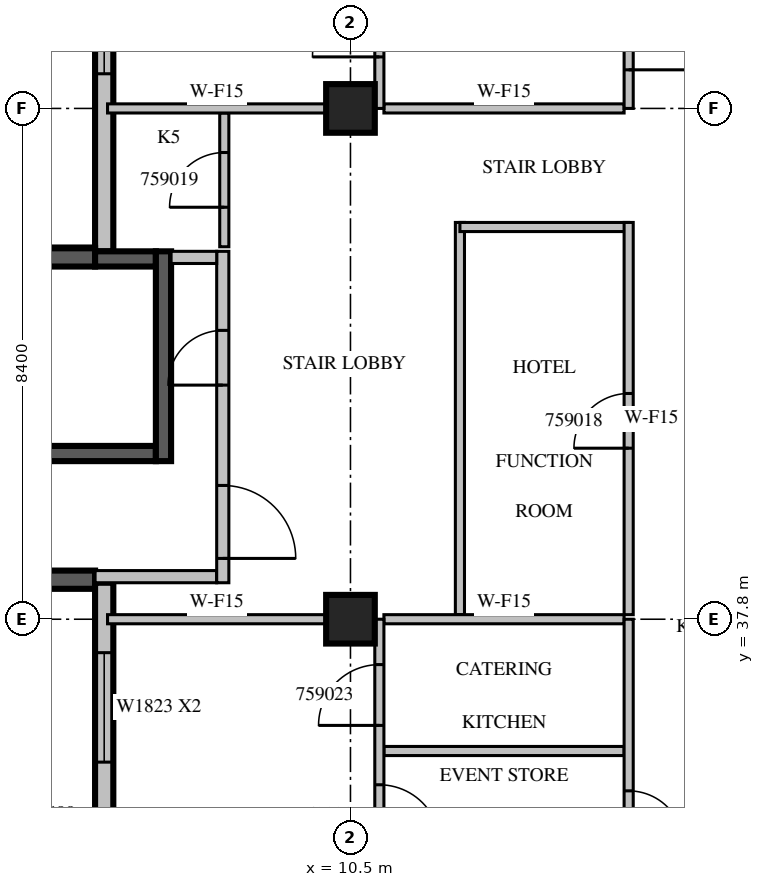
"""IFC4 building model, lengths in metres.
Left out: names, types, materials, properties, quantities, classifications, styles, units other than length and angle.
Written with IfcOpenShell. Run it as: python <this file> out.ifc"""

import sys

from ifc_helpers import new_model, si_unit, direction, frame, frame_2d, origin, origin_2d, place, context, subcontext, project, spatial, rectangle, extrude, source, transform, mapped, element, fill, save


model = new_model("IFC4")
c1 = context("Model", 3, precision=1e-05, world=origin(), true_north=direction((0.0, 1.0)))
c2 = subcontext(c1, "Body", "Model", "MODEL_VIEW")
j1 = project(units=[si_unit("LENGTHUNIT", "METRE"), si_unit("PLANEANGLEUNIT", "RADIAN")], contexts=[c1])
p1 = place(None, origin())
s1 = spatial("IfcSite", under=j1, at=p1, CompositionType="ELEMENT")
p2 = place(p1, origin())
s2 = spatial("IfcBuilding", under=s1, at=p2, CompositionType="ELEMENT")
p3 = place(p2, frame((0.0, 0.0, 257.6)))
s3 = spatial("IfcBuildingStorey", under=s2, at=p3, CompositionType="ELEMENT", Elevation=257.6)
m1 = source(origin(), c2, "Body", "SweptSolid", [
    extrude(rectangle(XDim=0.8, YDim=0.8, at=origin_2d()), origin(), (0.0, 0.0, 1.0), 3.8),
])
for number, where, z_axis, x_axis in (
    (1, (10.5, 37.8, 0.0), (0.0, 0.0, 1.0), (1.0, 0.0, 0.0)),
    (2, (10.5, 46.2, 0.0), (0.0, 0.0, 1.0), (1.0, 0.0, 0.0)),
):
    element("IfcColumn", number, at=place(p3, frame(where, z_axis=z_axis, x_axis=x_axis)), inside=s3, PredefinedType="COLUMN", context=c2, shape_type="MappedRepresentation", body=[
        mapped(m1, transform((0.0, 0.0, 0.0), scale=1.0)),
    ])
m2 = source(origin(), c2, "Body", "SweptSolid", [
    extrude(rectangle(XDim=9.91, YDim=0.3, at=frame_2d((4.955, 0.0))), origin(), (0.0, 0.0, 1.0), 3.4),
])
p4 = place(p3, frame((6.45, 53.76, 0.0), z_axis=(0.0, 0.0, 1.0), x_axis=(0.0, -1.0, 0.0)))
e3 = element("IfcWall", 3, at=p4, inside=s3, PredefinedType="STANDARD", context=c2, shape_type="MappedRepresentation", body=[
    mapped(m2, transform((0.0, 0.0, 0.0), scale=1.0)),
])
m3 = source(origin(), c2, "Body", "SweptSolid", [
    extrude(rectangle(XDim=3.6, YDim=2.3, at=frame_2d((1.8, 1.15))), frame((0.0, 0.16, 0.0), z_axis=(0.0, -1.0, 0.0), x_axis=(1.0, 0.0, 0.0)), (0.0, 0.0, 1.0), 0.32),
])
p5 = place(p4, frame((3.39, 0.0, 0.6)))
e4 = element("IfcOpeningElement", 4, at=p5, cuts=e3, PredefinedType="OPENING", context=c2, shape_type="MappedRepresentation", body=[
    mapped(m3, transform((0.0, 0.0, 0.0), scale=1.0)),
])
m4 = source(origin(), c2, "Body", "SweptSolid", [
    extrude(rectangle(XDim=2.4, YDim=2.3, at=frame_2d((1.2, 1.15))), frame((0.0, 0.16, 0.0), z_axis=(0.0, -1.0, 0.0), x_axis=(1.0, 0.0, 0.0)), (0.0, 0.0, 1.0), 0.32),
])
p6 = place(p4, frame((0.495, 0.0, 0.6)))
e5 = element("IfcOpeningElement", 5, at=p6, cuts=e3, PredefinedType="OPENING", context=c2, shape_type="MappedRepresentation", body=[
    mapped(m4, transform((0.0, 0.0, 0.0), scale=1.0)),
])
m5 = source(origin(), c2, "Body", "SweptSolid", [
    extrude(rectangle(XDim=6.1, YDim=0.3, at=frame_2d((3.05, 0.0))), origin(), (0.0, 0.0, 1.0), 3.4),
])
for number, where, z_axis, x_axis in (
    (6, (6.3, 43.75, 0.0), (0.0, 0.0, 1.0), (-1.0, 0.0, 0.0)),
    (7, (0.2, 38.45, 0.0), (0.0, 0.0, 1.0), (1.0, 0.0, 0.0)),
):
    element("IfcWall", number, at=place(p3, frame(where, z_axis=z_axis, x_axis=x_axis)), inside=s3, PredefinedType="SOLIDWALL", context=c2, shape_type="MappedRepresentation", body=[
        mapped(m5, transform((0.0, 0.0, 0.0), scale=1.0)),
    ])
m6 = source(origin(), c2, "Body", "SweptSolid", [
    extrude(rectangle(XDim=16.6, YDim=0.3, at=frame_2d((8.3, 0.0))), origin(), (0.0, 0.0, 1.0), 3.4),
])
p7 = place(p3, frame((6.45, 38.4, 0.0), z_axis=(0.0, 0.0, 1.0), x_axis=(0.0, -1.0, 0.0)))
e8 = element("IfcWall", 8, at=p7, inside=s3, PredefinedType="STANDARD", context=c2, shape_type="MappedRepresentation", body=[
    mapped(m6, transform((0.0, 0.0, 0.0), scale=1.0)),
])
m7 = source(origin(), c2, "Body", "SweptSolid", [
    extrude(rectangle(XDim=1.8, YDim=2.3, at=frame_2d((0.9, 1.15))), frame((0.0, 0.16, 0.0), z_axis=(0.0, -1.0, 0.0), x_axis=(1.0, 0.0, 0.0)), (0.0, 0.0, 1.0), 0.32),
])
p8 = place(p7, frame((1.15, 0.0, 0.6)))
e9 = element("IfcOpeningElement", 9, at=p8, cuts=e8, PredefinedType="OPENING", context=c2, shape_type="MappedRepresentation", body=[
    mapped(m7, transform((0.0, 0.0, 0.0), scale=1.0)),
])
p9 = place(p7, frame((9.438, 0.0, 0.6)))
e10 = element("IfcOpeningElement", 10, at=p9, cuts=e8, PredefinedType="OPENING", context=c2, shape_type="MappedRepresentation", body=[
    mapped(m7, transform((0.0, 0.0, 0.0), scale=1.0)),
])
m8 = source(origin(), c2, "Body", "SweptSolid", [
    extrude(rectangle(XDim=3.0, YDim=2.3, at=frame_2d((1.5, 1.15))), frame((0.0, 0.16, 0.0), z_axis=(0.0, -1.0, 0.0), x_axis=(1.0, 0.0, 0.0)), (0.0, 0.0, 1.0), 0.32),
])
p10 = place(p7, frame((12.7, 0.0, 0.6)))
e11 = element("IfcOpeningElement", 11, at=p10, cuts=e8, PredefinedType="OPENING", context=c2, shape_type="MappedRepresentation", body=[
    mapped(m8, transform((0.0, 0.0, 0.0), scale=1.0)),
])
m9 = source(origin(), c2, "Body", "SweptSolid", [
    extrude(rectangle(XDim=1.0, YDim=2.1, at=frame_2d((0.5, 1.05))), frame((0.0, 0.16, 0.0), z_axis=(0.0, -1.0, 0.0), x_axis=(1.0, 0.0, 0.0)), (0.0, 0.0, 1.0), 0.32),
])
p11 = place(p7, frame((5.45, 0.0, 0.0)))
e12 = element("IfcOpeningElement", 12, at=p11, cuts=e8, PredefinedType="OPENING", context=c2, shape_type="MappedRepresentation", body=[
    mapped(m9, transform((0.0, 0.0, 0.0), scale=1.0)),
])
m10 = source(origin(), c2, "Body", "SweptSolid", [
    extrude(rectangle(XDim=7.0, YDim=0.25, at=frame_2d((3.5, 0.0))), origin(), (0.0, 0.0, 1.0), 3.4),
])
p12 = place(p3, frame((0.3, 40.525, 0.0), z_axis=(0.0, 0.0, 1.0), x_axis=(1.0, 0.0, 0.0)))
e13 = element("IfcWall", 13, at=p12, inside=s3, PredefinedType="SOLIDWALL", context=c2, shape_type="MappedRepresentation", body=[
    mapped(m10, transform((0.0, 0.0, 0.0), scale=1.0)),
])
m11 = source(origin(), c2, "Body", "SweptSolid", [
    extrude(rectangle(XDim=1.1, YDim=2.1, at=frame_2d((0.55, 1.05))), frame((0.0, 0.135, 0.0), z_axis=(0.0, -1.0, 0.0), x_axis=(1.0, 0.0, 0.0)), (0.0, 0.0, 1.0), 0.27),
])
p13 = place(p12, frame((0.55, 0.0, 0.0)))
e14 = element("IfcOpeningElement", 14, at=p13, cuts=e13, PredefinedType="OPENING", context=c2, shape_type="MappedRepresentation", body=[
    mapped(m11, transform((0.0, 0.0, 0.0), scale=1.0)),
])
m12 = source(origin(), c2, "Body", "SweptSolid", [
    extrude(rectangle(XDim=1.0, YDim=0.25, at=frame_2d((0.5, 0.0))), origin(), (0.0, 0.0, 1.0), 3.4),
])
p14 = place(p3, frame((6.3, 43.725, 0.0), z_axis=(0.0, 0.0, 1.0), x_axis=(1.0, 0.0, 0.0)))
e15 = element("IfcWall", 15, at=p14, inside=s3, PredefinedType="SOLIDWALL", context=c2, shape_type="MappedRepresentation", body=[
    mapped(m12, transform((0.0, 0.0, 0.0), scale=1.0)),
])
m13 = source(origin(), c2, "Body", "SweptSolid", [
    extrude(rectangle(XDim=3.45, YDim=0.25, at=frame_2d((1.725, 0.0))), origin(), (0.0, 0.0, 1.0), 3.4),
])
p15 = place(p3, frame((7.425, 40.4, 0.0), z_axis=(0.0, 0.0, 1.0), x_axis=(0.0, 1.0, 0.0)))
e16 = element("IfcWall", 16, at=p15, inside=s3, PredefinedType="SOLIDWALL", context=c2, shape_type="MappedRepresentation", body=[
    mapped(m13, transform((0.0, 0.0, 0.0), scale=1.0)),
])
m14 = source(origin(), c2, "Body", "SweptSolid", [
    extrude(rectangle(XDim=2.0, YDim=0.2, at=frame_2d((1.0, 0.0))), origin(), (0.0, 0.0, 1.0), 3.4),
])
p16 = place(p3, frame((6.3, 38.5, 0.0), z_axis=(0.0, 0.0, 1.0), x_axis=(1.0, 0.0, 0.0)))
e17 = element("IfcWall", 17, at=p16, inside=s3, PredefinedType="PARTITIONING", context=c2, shape_type="MappedRepresentation", body=[
    mapped(m14, transform((0.0, 0.0, 0.0), scale=1.0)),
])
m15 = source(origin(), c2, "Body", "SweptSolid", [
    extrude(rectangle(XDim=5.45, YDim=0.2, at=frame_2d((2.725, 0.0))), origin(), (0.0, 0.0, 1.0), 3.4),
])
p17 = place(p3, frame((8.4, 38.4, 0.0), z_axis=(0.0, 0.0, 1.0), x_axis=(0.0, 1.0, 0.0)))
e18 = element("IfcWall", 18, at=p17, inside=s3, PredefinedType="PARTITIONING", context=c2, shape_type="MappedRepresentation", body=[
    mapped(m15, transform((0.0, 0.0, 0.0), scale=1.0)),
])
m16 = source(origin(), c2, "Body", "SweptSolid", [
    extrude(rectangle(XDim=1.2, YDim=2.1, at=frame_2d((0.6, 1.05))), frame((0.0, 0.11, 0.0), z_axis=(0.0, -1.0, 0.0), x_axis=(1.0, 0.0, 0.0)), (0.0, 0.0, 1.0), 0.22),
])
p18 = place(p17, frame((0.4, 0.0, 0.0)))
e19 = element("IfcOpeningElement", 19, at=p18, cuts=e18, PredefinedType="OPENING", context=c2, shape_type="MappedRepresentation", body=[
    mapped(m16, transform((0.0, 0.0, 0.0), scale=1.0)),
])
m17 = source(origin(), c2, "Body", "SweptSolid", [
    extrude(rectangle(XDim=0.9, YDim=2.1, at=frame_2d((0.45, 1.05))), frame((0.0, 0.11, 0.0), z_axis=(0.0, -1.0, 0.0), x_axis=(1.0, 0.0, 0.0)), (0.0, 0.0, 1.0), 0.22),
])
p19 = place(p17, frame((3.25, 0.0, 0.0)))
e20 = element("IfcOpeningElement", 20, at=p19, cuts=e18, PredefinedType="OPENING", context=c2, shape_type="MappedRepresentation", body=[
    mapped(m17, transform((0.0, 0.0, 0.0), scale=1.0)),
])
m18 = source(origin(), c2, "Body", "SweptSolid", [
    extrude(rectangle(XDim=0.75, YDim=0.2, at=frame_2d((0.375, 0.0))), origin(), (0.0, 0.0, 1.0), 3.4),
])
p20 = place(p3, frame((7.55, 43.75, 0.0), z_axis=(0.0, 0.0, 1.0), x_axis=(1.0, 0.0, 0.0)))
e21 = element("IfcWall", 21, at=p20, inside=s3, PredefinedType="PARTITIONING", context=c2, shape_type="MappedRepresentation", body=[
    mapped(m18, transform((0.0, 0.0, 0.0), scale=1.0)),
])
m19 = source(origin(), c2, "Body", "SweptSolid", [
    extrude(rectangle(XDim=6.45, YDim=0.15, at=frame_2d((3.225, 0.0))), origin(), (0.0, 0.0, 1.0), 3.4),
])
p21 = place(p3, frame((12.3, 44.325, 0.0), z_axis=(0.0, 0.0, 1.0), x_axis=(0.0, -1.0, 0.0)))
e22 = element("IfcWall", 22, at=p21, inside=s3, PredefinedType="PARTITIONING", context=c2, shape_type="MappedRepresentation", body=[
    mapped(m19, transform((0.0, 0.0, 0.0), scale=1.0)),
])
m20 = source(origin(), c2, "Body", "SweptSolid", [
    extrude(rectangle(XDim=2.775, YDim=0.15, at=frame_2d((1.387, 0.0))), origin(), (0.0, 0.0, 1.0), 3.4),
])
p22 = place(p3, frame((15.075, 44.25, 0.0), z_axis=(0.0, 0.0, 1.0), x_axis=(-1.0, 0.0, 0.0)))
e23 = element("IfcWall", 23, at=p22, inside=s3, PredefinedType="PARTITIONING", context=c2, shape_type="MappedRepresentation", body=[
    mapped(m20, transform((0.0, 0.0, 0.0), scale=1.0)),
])
p23 = place(p3, frame((15.075, 37.875, 0.0), z_axis=(0.0, 0.0, 1.0), x_axis=(0.0, 1.0, 0.0)))
e24 = element("IfcWall", 24, at=p23, inside=s3, PredefinedType="PARTITIONING", context=c2, shape_type="MappedRepresentation", body=[
    mapped(m19, transform((0.0, 0.0, 0.0), scale=1.0)),
])
m21 = source(origin(), c2, "Body", "SweptSolid", [
    extrude(rectangle(XDim=0.9, YDim=2.1, at=frame_2d((0.45, 1.05))), frame((0.0, 0.085, 0.0), z_axis=(0.0, -1.0, 0.0), x_axis=(1.0, 0.0, 0.0)), (0.0, 0.0, 1.0), 0.17),
])
p24 = place(p23, frame((2.737, 0.0, 0.0)))
e25 = element("IfcOpeningElement", 25, at=p24, cuts=e24, PredefinedType="OPENING", context=c2, shape_type="MappedRepresentation", body=[
    mapped(m21, transform((0.0, 0.0, 0.0), scale=1.0)),
])
m22 = source(origin(), c2, "Body", "SweptSolid", [
    extrude(rectangle(XDim=2.2, YDim=0.15, at=frame_2d((1.1, 0.0))), origin(), (0.0, 0.0, 1.0), 3.4),
])
p25 = place(p3, frame((8.425, 43.925, 0.0), z_axis=(0.0, 0.0, 1.0), x_axis=(0.0, 1.0, 0.0)))
e26 = element("IfcWall", 26, at=p25, inside=s3, PredefinedType="PARTITIONING", context=c2, shape_type="MappedRepresentation", body=[
    mapped(m22, transform((0.0, 0.0, 0.0), scale=1.0)),
])
p26 = place(p25, frame((0.65, 0.0, 0.0)))
e27 = element("IfcOpeningElement", 27, at=p26, cuts=e26, PredefinedType="OPENING", context=c2, shape_type="MappedRepresentation", body=[
    mapped(m21, transform((0.0, 0.0, 0.0), scale=1.0)),
])
m23 = source(origin(), c2, "Body", "SweptSolid", [
    extrude(rectangle(XDim=3.95, YDim=0.15, at=frame_2d((1.975, 0.0))), origin(), (0.0, 0.0, 1.0), 3.4),
])
p27 = place(p3, frame((15.0, 35.633, 0.0), z_axis=(0.0, 0.0, 1.0), x_axis=(-1.0, 0.0, 0.0)))
e28 = element("IfcWall", 28, at=p27, inside=s3, PredefinedType="PARTITIONING", context=c2, shape_type="MappedRepresentation", body=[
    mapped(m23, transform((0.0, 0.0, 0.0), scale=1.0)),
])
m24 = source(origin(), c2, "Body", "SweptSolid", [
    extrude(rectangle(XDim=3.596, YDim=0.15, at=frame_2d((1.798, 0.0))), origin(), (0.0, 0.0, 1.0), 3.4),
])
p28 = place(p3, frame((10.101, 37.8, 0.0), z_axis=(0.0, 0.0, 1.0), x_axis=(-1.0, 0.0, 0.0)))
e29 = element("IfcWall", 29, at=p28, inside=s3, PredefinedType="PARTITIONING", context=c2, shape_type="MappedRepresentation", body=[
    mapped(m24, transform((0.0, 0.0, 0.0), scale=1.0)),
])
p29 = place(p3, frame((15.0, 37.8, 0.0), z_axis=(0.0, 0.0, 1.0), x_axis=(-1.0, 0.0, 0.0)))
e30 = element("IfcWall", 30, at=p29, inside=s3, PredefinedType="PARTITIONING", context=c2, shape_type="MappedRepresentation", body=[
    mapped(m23, transform((0.0, 0.0, 0.0), scale=1.0)),
])
m25 = source(origin(), c2, "Body", "SweptSolid", [
    extrude(rectangle(XDim=8.4, YDim=0.15, at=frame_2d((4.2, 0.0))), origin(), (0.0, 0.0, 1.0), 3.4),
])
p30 = place(p3, frame((10.975, 29.4, 0.0), z_axis=(0.0, 0.0, 1.0), x_axis=(0.0, 1.0, 0.0)))
e31 = element("IfcWall", 31, at=p30, inside=s3, PredefinedType="PARTITIONING", context=c2, shape_type="MappedRepresentation", body=[
    mapped(m25, transform((0.0, 0.0, 0.0), scale=1.0)),
])
m26 = source(origin(), c2, "Body", "SweptSolid", [
    extrude(rectangle(XDim=1.6, YDim=2.1, at=frame_2d((0.8, 1.05))), frame((0.0, 0.085, 0.0), z_axis=(0.0, -1.0, 0.0), x_axis=(1.0, 0.0, 0.0)), (0.0, 0.0, 1.0), 0.17),
])
p31 = place(p30, frame((1.424, 0.0, 0.0)))
e32 = element("IfcOpeningElement", 32, at=p31, cuts=e31, PredefinedType="OPENING", context=c2, shape_type="MappedRepresentation", body=[
    mapped(m26, transform((0.0, 0.0, 0.0), scale=1.0)),
])
m27 = source(origin(), c2, "Body", "SweptSolid", [
    extrude(rectangle(XDim=1.0, YDim=2.1, at=frame_2d((0.5, 1.05))), frame((0.0, 0.085, 0.0), z_axis=(0.0, -1.0, 0.0), x_axis=(1.0, 0.0, 0.0)), (0.0, 0.0, 1.0), 0.17),
])
p32 = place(p30, frame((4.678, 0.0, 0.0)))
e33 = element("IfcOpeningElement", 33, at=p32, cuts=e31, PredefinedType="OPENING", context=c2, shape_type="MappedRepresentation", body=[
    mapped(m27, transform((0.0, 0.0, 0.0), scale=1.0)),
])
p33 = place(p30, frame((6.654, 0.0, 0.0)))
e34 = element("IfcOpeningElement", 34, at=p33, cuts=e31, PredefinedType="OPENING", context=c2, shape_type="MappedRepresentation", body=[
    mapped(m27, transform((0.0, 0.0, 0.0), scale=1.0)),
])
p34 = place(p3, frame((10.101, 46.2, 0.0), z_axis=(0.0, 0.0, 1.0), x_axis=(-1.0, 0.0, 0.0)))
e35 = element("IfcWall", 35, at=p34, inside=s3, PredefinedType="PARTITIONING", context=c2, shape_type="MappedRepresentation", body=[
    mapped(m24, transform((0.0, 0.0, 0.0), scale=1.0)),
])
p35 = place(p3, frame((15.0, 46.2, 0.0), z_axis=(0.0, 0.0, 1.0), x_axis=(-1.0, 0.0, 0.0)))
e36 = element("IfcWall", 36, at=p35, inside=s3, PredefinedType="PARTITIONING", context=c2, shape_type="MappedRepresentation", body=[
    mapped(m23, transform((0.0, 0.0, 0.0), scale=1.0)),
])
m28 = source(origin(), c2, "Body", "SweptSolid", [
    extrude(rectangle(XDim=7.26, YDim=0.15, at=frame_2d((3.63, 0.0))), origin(), (0.0, 0.0, 1.0), 3.4),
])
p36 = place(p3, frame((10.975, 46.2, 0.0), z_axis=(0.0, 0.0, 1.0), x_axis=(0.0, 1.0, 0.0)))
e37 = element("IfcWall", 37, at=p36, inside=s3, PredefinedType="PARTITIONING", context=c2, shape_type="MappedRepresentation", body=[
    mapped(m28, transform((0.0, 0.0, 0.0), scale=1.0)),
])
m29 = source(origin(), c2, "Body", "SweptSolid", [
    extrude(rectangle(XDim=1.1, YDim=2.1, at=frame_2d((0.55, 1.05))), frame((0.0, 0.085, 0.0), z_axis=(0.0, -1.0, 0.0), x_axis=(1.0, 0.0, 0.0)), (0.0, 0.0, 1.0), 0.17),
])
p37 = place(p36, frame((0.847, 0.0, 0.0)))
e38 = element("IfcOpeningElement", 38, at=p37, cuts=e37, PredefinedType="OPENING", context=c2, shape_type="MappedRepresentation", body=[
    mapped(m29, transform((0.0, 0.0, 0.0), scale=1.0)),
])
p38 = place(p36, frame((2.946, 0.0, 0.0)))
e39 = element("IfcOpeningElement", 39, at=p38, cuts=e37, PredefinedType="OPENING", context=c2, shape_type="MappedRepresentation", body=[
    mapped(m21, transform((0.0, 0.0, 0.0), scale=1.0)),
])
p39 = place(p36, frame((4.529, 0.0, 0.0)))
e40 = element("IfcOpeningElement", 40, at=p39, cuts=e37, PredefinedType="OPENING", context=c2, shape_type="MappedRepresentation", body=[
    mapped(m21, transform((0.0, 0.0, 0.0), scale=1.0)),
])
p40 = place(p3, frame((15.075, 29.4, 0.0), z_axis=(0.0, 0.0, 1.0), x_axis=(0.0, 1.0, 0.0)))
e41 = element("IfcWall", 41, at=p40, inside=s3, PredefinedType="PARTITIONING", context=c2, shape_type="MappedRepresentation", body=[
    mapped(m25, transform((0.0, 0.0, 0.0), scale=1.0)),
])
p41 = place(p40, frame((1.211, 0.0, 0.0)))
e42 = element("IfcOpeningElement", 42, at=p41, cuts=e41, PredefinedType="OPENING", context=c2, shape_type="MappedRepresentation", body=[
    mapped(m26, transform((0.0, 0.0, 0.0), scale=1.0)),
])
p42 = place(p40, frame((4.678, 0.0, 0.0)))
e43 = element("IfcOpeningElement", 43, at=p42, cuts=e41, PredefinedType="OPENING", context=c2, shape_type="MappedRepresentation", body=[
    mapped(m21, transform((0.0, 0.0, 0.0), scale=1.0)),
])
p43 = place(p3, frame((15.075, 46.2, 0.0), z_axis=(0.0, 0.0, 1.0), x_axis=(0.0, 1.0, 0.0)))
e44 = element("IfcWall", 44, at=p43, inside=s3, PredefinedType="PARTITIONING", context=c2, shape_type="MappedRepresentation", body=[
    mapped(m28, transform((0.0, 0.0, 0.0), scale=1.0)),
])
p44 = place(p43, frame((0.635, 0.0, 0.0)))
e45 = element("IfcOpeningElement", 45, at=p44, cuts=e44, PredefinedType="OPENING", context=c2, shape_type="MappedRepresentation", body=[
    mapped(m29, transform((0.0, 0.0, 0.0), scale=1.0)),
])
m30 = source(origin(), c2, "Body", "SweptSolid", [
    extrude(rectangle(XDim=3.6, YDim=2.3, at=frame_2d((1.8, 1.15))), frame((0.0, 0.03, 0.0), z_axis=(0.0, -1.0, 0.0), x_axis=(1.0, 0.0, 0.0)), (0.0, 0.0, 1.0), 0.06),
])
p45 = place(p5, origin())
e46 = element("IfcWindow", 46, at=p45, inside=s3, PartitioningType="SINGLE_PANEL", PredefinedType="WINDOW", context=c2, shape_type="MappedRepresentation", body=[
    mapped(m30, transform((0.0, 0.0, 0.0), scale=1.0)),
])
fill(e4, e46)
m31 = source(origin(), c2, "Body", "SweptSolid", [
    extrude(rectangle(XDim=1.8, YDim=2.3, at=frame_2d((0.9, 1.15))), frame((0.0, 0.03, 0.0), z_axis=(0.0, -1.0, 0.0), x_axis=(1.0, 0.0, 0.0)), (0.0, 0.0, 1.0), 0.06),
])
p46 = place(p8, origin())
e47 = element("IfcWindow", 47, at=p46, inside=s3, PartitioningType="SINGLE_PANEL", PredefinedType="WINDOW", context=c2, shape_type="MappedRepresentation", body=[
    mapped(m31, transform((0.0, 0.0, 0.0), scale=1.0)),
])
fill(e9, e47)
m32 = source(origin(), c2, "Body", "SweptSolid", [
    extrude(rectangle(XDim=1.2, YDim=2.1, at=frame_2d((0.6, 1.05))), frame((0.0, 0.025, 0.0), z_axis=(0.0, -1.0, 0.0), x_axis=(1.0, 0.0, 0.0)), (0.0, 0.0, 1.0), 0.05),
])
p47 = place(p18, origin())
e48 = element("IfcDoor", 48, at=p47, inside=s3, OperationType="SINGLE_SWING_RIGHT", PredefinedType="DOOR", context=c2, shape_type="MappedRepresentation", body=[
    mapped(m32, transform((0.0, 0.0, 0.0), scale=1.0)),
])
fill(e19, e48)
m33 = source(origin(), c2, "Body", "SweptSolid", [
    extrude(rectangle(XDim=0.9, YDim=2.1, at=frame_2d((0.45, 1.05))), frame((0.0, 0.025, 0.0), z_axis=(0.0, -1.0, 0.0), x_axis=(1.0, 0.0, 0.0)), (0.0, 0.0, 1.0), 0.05),
])
p48 = place(p19, origin())
e49 = element("IfcDoor", 49, at=p48, inside=s3, OperationType="SINGLE_SWING_LEFT", PredefinedType="DOOR", context=c2, shape_type="MappedRepresentation", body=[
    mapped(m33, transform((0.0, 0.0, 0.0), scale=1.0)),
])
fill(e20, e49)
p49 = place(p24, origin())
e50 = element("IfcDoor", 50, at=p49, inside=s3, OperationType="SINGLE_SWING_LEFT", PredefinedType="DOOR", context=c2, shape_type="MappedRepresentation", body=[
    mapped(m33, transform((0.0, 0.0, 0.0), scale=1.0)),
])
fill(e25, e50)
p50 = place(p26, origin())
e51 = element("IfcDoor", 51, at=p50, inside=s3, OperationType="SINGLE_SWING_LEFT", PredefinedType="DOOR", context=c2, shape_type="MappedRepresentation", body=[
    mapped(m33, transform((0.0, 0.0, 0.0), scale=1.0)),
])
fill(e27, e51)
m34 = source(origin(), c2, "Body", "SweptSolid", [
    extrude(rectangle(XDim=1.0, YDim=2.1, at=frame_2d((0.5, 1.05))), frame((0.0, 0.025, 0.0), z_axis=(0.0, -1.0, 0.0), x_axis=(1.0, 0.0, 0.0)), (0.0, 0.0, 1.0), 0.05),
])
p51 = place(p32, origin())
e52 = element("IfcDoor", 52, at=p51, inside=s3, OperationType="SINGLE_SWING_RIGHT", PredefinedType="DOOR", context=c2, shape_type="MappedRepresentation", body=[
    mapped(m34, transform((0.0, 0.0, 0.0), scale=1.0)),
])
fill(e33, e52)
p52 = place(p33, origin())
e53 = element("IfcDoor", 53, at=p52, inside=s3, OperationType="SINGLE_SWING_LEFT", PredefinedType="DOOR", context=c2, shape_type="MappedRepresentation", body=[
    mapped(m34, transform((0.0, 0.0, 0.0), scale=1.0)),
])
fill(e34, e53)
p53 = place(p42, origin())
e54 = element("IfcDoor", 54, at=p53, inside=s3, OperationType="SINGLE_SWING_RIGHT", PredefinedType="DOOR", context=c2, shape_type="MappedRepresentation", body=[
    mapped(m33, transform((0.0, 0.0, 0.0), scale=1.0)),
])
fill(e43, e54)
m35 = source(origin(), c2, "Body", "SweptSolid", [
    extrude(rectangle(XDim=1.1, YDim=2.1, at=frame_2d((0.55, 1.05))), frame((0.0, 0.025, 0.0), z_axis=(0.0, -1.0, 0.0), x_axis=(1.0, 0.0, 0.0)), (0.0, 0.0, 1.0), 0.05),
])
p54 = place(p44, origin())
e55 = element("IfcDoor", 55, at=p54, inside=s3, OperationType="SINGLE_SWING_RIGHT", PredefinedType="DOOR", context=c2, shape_type="MappedRepresentation", body=[
    mapped(m35, transform((0.0, 0.0, 0.0), scale=1.0)),
])
fill(e45, e55)
p55 = place(p37, origin())
e56 = element("IfcDoor", 56, at=p55, inside=s3, OperationType="SINGLE_SWING_LEFT", PredefinedType="DOOR", context=c2, shape_type="MappedRepresentation", body=[
    mapped(m35, transform((0.0, 0.0, 0.0), scale=1.0)),
])
fill(e38, e56)
save(model, sys.argv[1])
